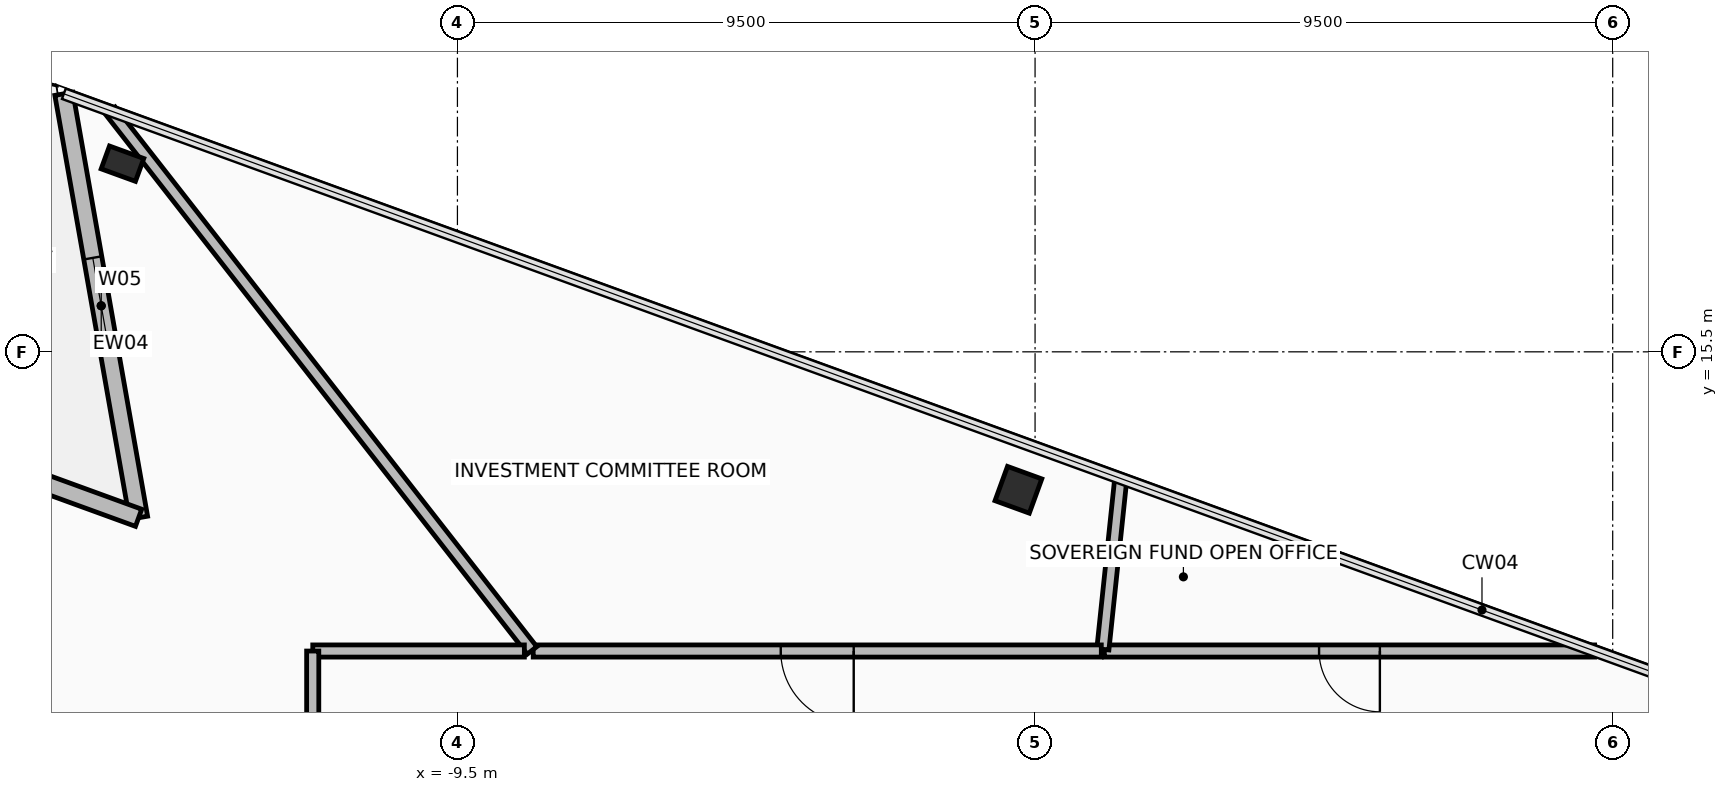
"""IFC4 building model, lengths in metres.
Left out: names, types, materials, properties, quantities, classifications, styles, units other than length and angle.
Written with IfcOpenShell. Run it as: python <this file> out.ifc"""

import sys

from ifc_helpers import new_model, si_unit, direction, frame, frame_2d, origin, origin_2d, place, context, subcontext, project, spatial, rectangle, hollow_rectangle, extrude, element, fill, save


model = new_model("IFC4")
c1 = context("Model", 3, precision=1e-05, world=origin(), true_north=direction((0.0, 1.0)))
c2 = subcontext(c1, "Body", "Model", "MODEL_VIEW")
j1 = project(units=[si_unit("LENGTHUNIT", "METRE"), si_unit("PLANEANGLEUNIT", "RADIAN")], contexts=[c1])
p1 = place(None, origin())
s1 = spatial("IfcSite", under=j1, at=p1, CompositionType="ELEMENT")
p2 = place(p1, origin())
s2 = spatial("IfcBuilding", under=s1, at=p2, CompositionType="ELEMENT")
p3 = place(p2, frame((0.0, 0.0, 181.3)))
s3 = spatial("IfcBuildingStorey", under=s2, at=p3, CompositionType="ELEMENT", Elevation=181.3)
p4 = place(p3, frame((-0.274, 13.231, 0.0), z_axis=(0.0, 0.0, 1.0), x_axis=(-0.939692023847, 0.342021783398, 0.0)))
e1 = element("IfcColumn", 1, at=p4, inside=s3, PredefinedType="COLUMN", context=c2, shape_type="SweptSolid", body=[
    extrude(hollow_rectangle(XDim=0.6, YDim=0.6, WallThickness=0.036, at=origin_2d()), origin(), (0.0, 0.0, 1.0), 3.6),
])
p5 = place(p3, frame((-15.009, 18.594, 0.0), z_axis=(0.0, 0.0, 1.0), x_axis=(-0.939692023847, 0.342021783398, 0.0)))
e2 = element("IfcColumn", 2, at=p5, inside=s3, PredefinedType="COLUMN", context=c2, shape_type="SweptSolid", body=[
    extrude(hollow_rectangle(XDim=0.4, YDim=0.6, WallThickness=0.03, at=origin_2d()), origin(), (0.0, 0.0, 1.0), 3.6),
])
p6 = place(p3, frame((-15.973, 19.743, 0.0), z_axis=(0.0, 0.0, 1.0), x_axis=(0.173651569749, -0.984807154891, 0.0)))
e3 = element("IfcWall", 3, at=p6, inside=s3, PredefinedType="STANDARD", context=c2, shape_type="SweptSolid", body=[
    extrude(rectangle(XDim=7.08, YDim=0.3, at=frame_2d((3.54, 0.0))), origin(), (0.0, 0.0, 1.0), 2.715),
])
p7 = place(p6, frame((2.74, 0.0, 0.335)))
e4 = element("IfcOpeningElement", 4, at=p7, cuts=e3, PredefinedType="OPENING", context=c2, shape_type="SweptSolid", body=[
    extrude(rectangle(XDim=1.6, YDim=2.2, at=frame_2d((0.8, 1.1))), frame((0.0, 0.16, 0.0), z_axis=(0.0, -1.0, 0.0), x_axis=(1.0, 0.0, 0.0)), (0.0, 0.0, 1.0), 0.32),
])
p8 = place(p3, frame((-14.744, 12.771, 0.0), z_axis=(0.0, 0.0, 1.0), x_axis=(-0.939687665182, 0.342033758429, 0.0)))
e5 = element("IfcWall", 5, at=p8, inside=s3, PredefinedType="STANDARD", context=c2, shape_type="SweptSolid", body=[
    extrude(rectangle(XDim=7.08, YDim=0.3, at=frame_2d((3.54, 0.0))), origin(), (0.0, 0.0, 1.0), 2.715),
])
p9 = place(p8, frame((2.608, 0.0, 0.0)))
e6 = element("IfcOpeningElement", 6, at=p9, cuts=e5, PredefinedType="OPENING", context=c2, shape_type="SweptSolid", body=[
    extrude(rectangle(XDim=1.1, YDim=2.2, at=frame_2d((0.55, 1.1))), frame((0.0, 0.16, 0.0), z_axis=(0.0, -1.0, 0.0), x_axis=(1.0, 0.0, 0.0)), (0.0, 0.0, 1.0), 0.32),
])
p10 = place(p3, frame((9.203, 10.58, 0.0), z_axis=(0.0, 0.0, 1.0), x_axis=(-1.0, 0.0, 0.0)))
e7 = element("IfcWall", 7, at=p10, inside=s3, PredefinedType="PARTITIONING", context=c2, shape_type="SweptSolid", body=[
    extrude(rectangle(XDim=8.063, YDim=0.2, at=frame_2d((4.031, 0.0))), origin(), (0.0, 0.0, 1.0), 2.715),
])
p11 = place(p10, frame((3.532, 0.0, 0.0)))
e8 = element("IfcOpeningElement", 8, at=p11, cuts=e7, PredefinedType="OPENING", context=c2, shape_type="SweptSolid", body=[
    extrude(rectangle(XDim=1.0, YDim=2.15, at=frame_2d((0.5, 1.075))), frame((0.0, 0.11, 0.0), z_axis=(0.0, -1.0, 0.0), x_axis=(1.0, 0.0, 0.0)), (0.0, 0.0, 1.0), 0.22),
])
p12 = place(p3, frame((1.115, 10.608, 0.0), z_axis=(0.0, 0.0, 1.0), x_axis=(0.10451827762, 0.99452296587, 0.0)))
e9 = element("IfcWall", 9, at=p12, inside=s3, PredefinedType="PARTITIONING", context=c2, shape_type="SweptSolid", body=[
    extrude(rectangle(XDim=2.824, YDim=0.2, at=frame_2d((1.412, 0.0))), origin(), (0.0, 0.0, 1.0), 2.715),
])
p13 = place(p3, frame((1.09, 10.58, 0.0), z_axis=(0.0, 0.0, 1.0), x_axis=(-1.0, 0.0, 0.0)))
e10 = element("IfcWall", 10, at=p13, inside=s3, PredefinedType="PARTITIONING", context=c2, shape_type="SweptSolid", body=[
    extrude(rectangle(XDim=9.344, YDim=0.2, at=frame_2d((4.672, 0.0))), origin(), (0.0, 0.0, 1.0), 3.055),
])
p14 = place(p13, frame((4.072, 0.0, 0.0)))
e11 = element("IfcOpeningElement", 11, at=p14, cuts=e10, PredefinedType="OPENING", context=c2, shape_type="SweptSolid", body=[
    extrude(rectangle(XDim=1.2, YDim=2.15, at=frame_2d((0.6, 1.075))), frame((0.0, 0.11, 0.0), z_axis=(0.0, -1.0, 0.0), x_axis=(1.0, 0.0, 0.0)), (0.0, 0.0, 1.0), 0.22),
])
p15 = place(p3, frame((-8.273, 10.59, 0.0), z_axis=(0.0, 0.0, 1.0), x_axis=(-0.61567096372, 0.788003340369, 0.0)))
e12 = element("IfcWall", 12, at=p15, inside=s3, PredefinedType="PARTITIONING", context=c2, shape_type="SweptSolid", body=[
    extrude(rectangle(XDim=11.263, YDim=0.2, at=frame_2d((5.631, 0.0))), origin(), (0.0, 0.0, 1.0), 2.715),
])
p16 = place(p3, frame((-8.399, 10.58, 0.0), z_axis=(0.0, 0.0, 1.0), x_axis=(-1.0, 0.0, 0.0)))
e13 = element("IfcWall", 13, at=p16, inside=s3, PredefinedType="PARTITIONING", context=c2, shape_type="SweptSolid", body=[
    extrude(rectangle(XDim=3.48, YDim=0.2, at=frame_2d((1.74, 0.0))), origin(), (0.0, 0.0, 1.0), 2.765),
])
p17 = place(p3, frame((-11.88, 10.579, 0.0), z_axis=(0.0, 0.0, 1.0), x_axis=(0.0, -1.0, 0.0)))
e14 = element("IfcWall", 14, at=p17, inside=s3, PredefinedType="PARTITIONING", context=c2, shape_type="SweptSolid", body=[
    extrude(rectangle(XDim=8.881, YDim=0.2, at=frame_2d((4.44, 0.0))), origin(), (0.0, 0.0, 1.0), 2.765),
])
p18 = place(p17, frame((3.941, 0.0, 0.0)))
e15 = element("IfcOpeningElement", 15, at=p18, cuts=e14, PredefinedType="OPENING", context=c2, shape_type="SweptSolid", body=[
    extrude(rectangle(XDim=1.0, YDim=2.15, at=frame_2d((0.5, 1.075))), frame((0.0, 0.11, 0.0), z_axis=(0.0, -1.0, 0.0), x_axis=(1.0, 0.0, 0.0)), (0.0, 0.0, 1.0), 0.22),
])
p19 = place(p7, origin())
e16 = element("IfcWindow", 16, at=p19, inside=s3, PartitioningType="SINGLE_PANEL", PredefinedType="WINDOW", context=c2, shape_type="SweptSolid", body=[
    extrude(rectangle(XDim=1.6, YDim=2.2, at=frame_2d((0.8, 1.1))), frame((0.0, 0.03, 0.0), z_axis=(0.0, -1.0, 0.0), x_axis=(1.0, 0.0, 0.0)), (0.0, 0.0, 1.0), 0.06),
])
fill(e4, e16)
p20 = place(p11, origin())
e17 = element("IfcDoor", 17, at=p20, inside=s3, OperationType="SINGLE_SWING_RIGHT", PredefinedType="DOOR", context=c2, shape_type="SweptSolid", body=[
    extrude(rectangle(XDim=1.0, YDim=2.15, at=frame_2d((0.5, 1.075))), frame((0.0, 0.025, 0.0), z_axis=(0.0, -1.0, 0.0), x_axis=(1.0, 0.0, 0.0)), (0.0, 0.0, 1.0), 0.05),
])
fill(e8, e17)
p21 = place(p14, origin())
e18 = element("IfcDoor", 18, at=p21, inside=s3, OperationType="SINGLE_SWING_LEFT", PredefinedType="DOOR", context=c2, shape_type="SweptSolid", body=[
    extrude(rectangle(XDim=1.2, YDim=2.15, at=frame_2d((0.6, 1.075))), frame((0.0, 0.025, 0.0), z_axis=(0.0, -1.0, 0.0), x_axis=(1.0, 0.0, 0.0)), (0.0, 0.0, 1.0), 0.05),
])
fill(e11, e18)
save(model, sys.argv[1])
